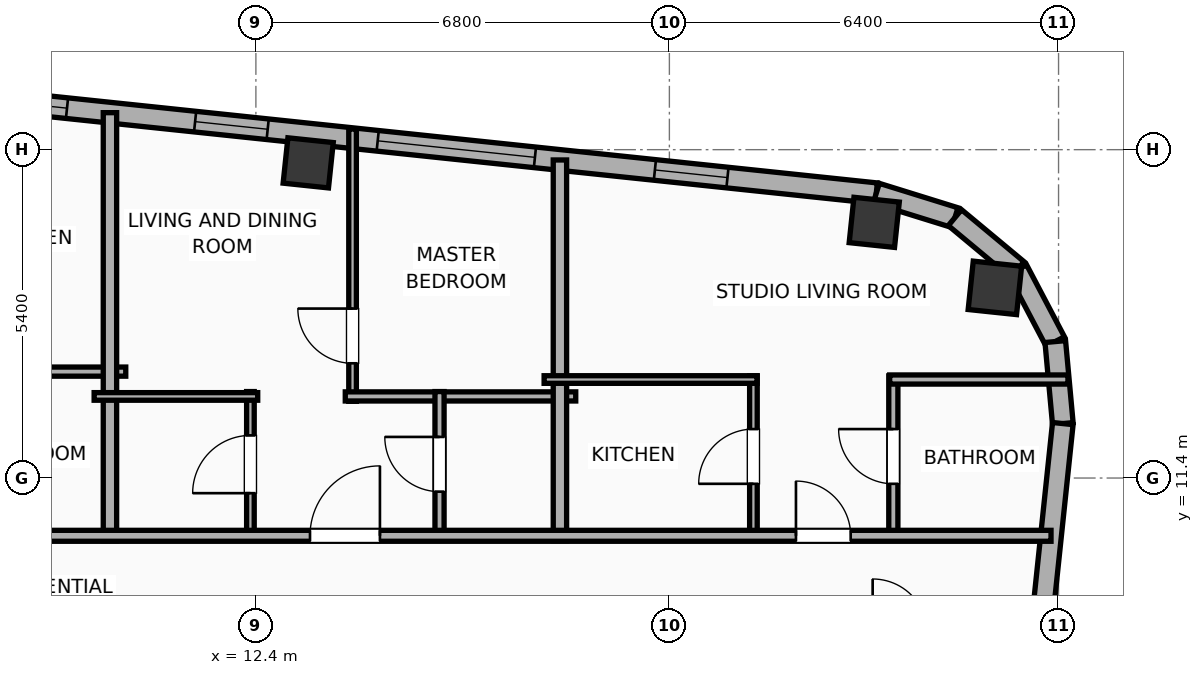
"""IFC4 building model, lengths in metres.
Left out: names, types, materials, properties, quantities, classifications, styles, units other than length and angle.
Written with IfcOpenShell. Run it as: python <this file> out.ifc"""

import sys

from ifc_helpers import new_model, si_unit, direction, frame, frame_2d, origin, origin_2d, place, context, subcontext, project, spatial, rectangle, hollow_rectangle, hollow_circle, extrude, element, fill, save


model = new_model("IFC4")
c1 = context("Model", 3, precision=1e-05, world=origin(), true_north=direction((0.0, 1.0)))
c2 = subcontext(c1, "Body", "Model", "MODEL_VIEW")
j1 = project(units=[si_unit("LENGTHUNIT", "METRE"), si_unit("PLANEANGLEUNIT", "RADIAN")], contexts=[c1])
p1 = place(None, origin())
s1 = spatial("IfcSite", under=j1, at=p1, CompositionType="ELEMENT")
p2 = place(p1, origin())
s2 = spatial("IfcBuilding", under=s1, at=p2, CompositionType="ELEMENT")
p3 = place(p2, frame((0.0, 0.0, 306.8)))
s3 = spatial("IfcBuildingStorey", under=s2, at=p3, CompositionType="ELEMENT", Elevation=306.8)
p4 = place(p3, frame((24.553, 14.527, 0.0), z_axis=(0.0, 0.0, 1.0), x_axis=(0.994521895368, -0.104528463268, 0.0)))
e1 = element("IfcColumn", 1, at=p4, inside=s3, PredefinedType="COLUMN", context=c2, shape_type="SweptSolid", body=[
    extrude(hollow_circle(Radius=0.4, WallThickness=0.028, at=origin_2d()), origin(), (0.0, 0.0, 1.0), 3.865),
])
for number, where, z_axis, x_axis in (
    (2, (22.569, 15.604, 0.0), (0.0, 0.0, 1.0), (0.995, -0.105, 0.0)),
    (3, (13.26, 16.583, 0.0), (0.0, 0.0, 1.0), (0.995, -0.105, 0.0)),
):
    element("IfcColumn", number, at=place(p3, frame(where, z_axis=z_axis, x_axis=x_axis)), inside=s3, PredefinedType="COLUMN", context=c2, shape_type="SweptSolid", body=[
        extrude(hollow_rectangle(XDim=0.75, YDim=0.75, WallThickness=0.025, at=origin_2d()), origin(), (0.0, 0.0, 1.0), 3.865),
    ])
p5 = place(p3, frame((-23.908, 20.972, 0.0), z_axis=(0.0, 0.0, 1.0), x_axis=(0.994521888554, -0.104528528102, 0.0)))
e4 = element("IfcWall", 4, at=p5, inside=s3, PredefinedType="ELEMENTEDWALL", context=c2, shape_type="SweptSolid", body=[
    extrude(rectangle(XDim=46.766, YDim=0.34, at=frame_2d((23.383, 0.0))), origin(), (0.0, 0.0, 1.0), 2.39),
])
p6 = place(p5, frame((23.733, 0.0, 0.65)))
e5 = element("IfcOpeningElement", 5, at=p6, cuts=e4, PredefinedType="OPENING", context=c2, shape_type="SweptSolid", body=[
    extrude(rectangle(XDim=2.6, YDim=1.45, at=frame_2d((1.3, 0.725))), frame((0.0, 0.18, 0.0), z_axis=(0.0, -1.0, 0.0), x_axis=(1.0, 0.0, 0.0)), (0.0, 0.0, 1.0), 0.36),
])
p7 = place(p5, frame((38.522, 0.0, 0.65)))
e6 = element("IfcOpeningElement", 6, at=p7, cuts=e4, PredefinedType="OPENING", context=c2, shape_type="SweptSolid", body=[
    extrude(rectangle(XDim=2.6, YDim=1.45, at=frame_2d((1.3, 0.725))), frame((0.0, 0.18, 0.0), z_axis=(0.0, -1.0, 0.0), x_axis=(1.0, 0.0, 0.0)), (0.0, 0.0, 1.0), 0.36),
])
p8 = place(p5, frame((2.019, 0.0, 0.55)))
e7 = element("IfcOpeningElement", 7, at=p8, cuts=e4, PredefinedType="OPENING", context=c2, shape_type="SweptSolid", body=[
    extrude(rectangle(XDim=1.2, YDim=1.15, at=frame_2d((0.6, 0.575))), frame((0.0, 0.18, 0.0), z_axis=(0.0, -1.0, 0.0), x_axis=(1.0, 0.0, 0.0)), (0.0, 0.0, 1.0), 0.36),
])
p9 = place(p5, frame((9.966, 0.0, 0.55)))
e8 = element("IfcOpeningElement", 8, at=p9, cuts=e4, PredefinedType="OPENING", context=c2, shape_type="SweptSolid", body=[
    extrude(rectangle(XDim=1.2, YDim=1.15, at=frame_2d((0.6, 0.575))), frame((0.0, 0.18, 0.0), z_axis=(0.0, -1.0, 0.0), x_axis=(1.0, 0.0, 0.0)), (0.0, 0.0, 1.0), 0.36),
])
p10 = place(p5, frame((5.046, 0.0, 0.55)))
e9 = element("IfcOpeningElement", 9, at=p10, cuts=e4, PredefinedType="OPENING", context=c2, shape_type="SweptSolid", body=[
    extrude(rectangle(XDim=1.2, YDim=1.15, at=frame_2d((0.6, 0.575))), frame((0.0, 0.18, 0.0), z_axis=(0.0, -1.0, 0.0), x_axis=(1.0, 0.0, 0.0)), (0.0, 0.0, 1.0), 0.36),
])
p11 = place(p5, frame((16.207, 0.0, 0.55)))
e10 = element("IfcOpeningElement", 10, at=p11, cuts=e4, PredefinedType="OPENING", context=c2, shape_type="SweptSolid", body=[
    extrude(rectangle(XDim=1.2, YDim=1.15, at=frame_2d((0.6, 0.575))), frame((0.0, 0.18, 0.0), z_axis=(0.0, -1.0, 0.0), x_axis=(1.0, 0.0, 0.0)), (0.0, 0.0, 1.0), 0.36),
])
p12 = place(p5, frame((12.487, 0.0, 0.55)))
e11 = element("IfcOpeningElement", 11, at=p12, cuts=e4, PredefinedType="OPENING", context=c2, shape_type="SweptSolid", body=[
    extrude(rectangle(XDim=1.2, YDim=1.15, at=frame_2d((0.6, 0.575))), frame((0.0, 0.18, 0.0), z_axis=(0.0, -1.0, 0.0), x_axis=(1.0, 0.0, 0.0)), (0.0, 0.0, 1.0), 0.36),
])
p13 = place(p5, frame((20.621, 0.0, 0.55)))
e12 = element("IfcOpeningElement", 12, at=p13, cuts=e4, PredefinedType="OPENING", context=c2, shape_type="SweptSolid", body=[
    extrude(rectangle(XDim=1.2, YDim=1.15, at=frame_2d((0.6, 0.575))), frame((0.0, 0.18, 0.0), z_axis=(0.0, -1.0, 0.0), x_axis=(1.0, 0.0, 0.0)), (0.0, 0.0, 1.0), 0.36),
])
p14 = place(p5, frame((28.704, 0.0, 0.55)))
e13 = element("IfcOpeningElement", 13, at=p14, cuts=e4, PredefinedType="OPENING", context=c2, shape_type="SweptSolid", body=[
    extrude(rectangle(XDim=1.2, YDim=1.15, at=frame_2d((0.6, 0.575))), frame((0.0, 0.18, 0.0), z_axis=(0.0, -1.0, 0.0), x_axis=(1.0, 0.0, 0.0)), (0.0, 0.0, 1.0), 0.36),
])
p15 = place(p5, frame((32.185, 0.0, 0.55)))
e14 = element("IfcOpeningElement", 14, at=p15, cuts=e4, PredefinedType="OPENING", context=c2, shape_type="SweptSolid", body=[
    extrude(rectangle(XDim=1.2, YDim=1.15, at=frame_2d((0.6, 0.575))), frame((0.0, 0.18, 0.0), z_axis=(0.0, -1.0, 0.0), x_axis=(1.0, 0.0, 0.0)), (0.0, 0.0, 1.0), 0.36),
])
p16 = place(p5, frame((35.503, 0.0, 0.55)))
e15 = element("IfcOpeningElement", 15, at=p16, cuts=e4, PredefinedType="OPENING", context=c2, shape_type="SweptSolid", body=[
    extrude(rectangle(XDim=1.2, YDim=1.15, at=frame_2d((0.6, 0.575))), frame((0.0, 0.18, 0.0), z_axis=(0.0, -1.0, 0.0), x_axis=(1.0, 0.0, 0.0)), (0.0, 0.0, 1.0), 0.36),
])
p17 = place(p5, frame((43.106, 0.0, 0.55)))
e16 = element("IfcOpeningElement", 16, at=p17, cuts=e4, PredefinedType="OPENING", context=c2, shape_type="SweptSolid", body=[
    extrude(rectangle(XDim=1.2, YDim=1.15, at=frame_2d((0.6, 0.575))), frame((0.0, 0.18, 0.0), z_axis=(0.0, -1.0, 0.0), x_axis=(1.0, 0.0, 0.0)), (0.0, 0.0, 1.0), 0.36),
])
p18 = place(p3, frame((22.603, 16.084, 0.0), z_axis=(0.0, 0.0, 1.0), x_axis=(0.955007802701, -0.296580674994, 0.0)))
e17 = element("IfcWall", 17, at=p18, inside=s3, PredefinedType="ELEMENTEDWALL", context=c2, shape_type="SweptSolid", body=[
    extrude(rectangle(XDim=1.354, YDim=0.34, at=frame_2d((0.677, 0.0))), origin(), (0.0, 0.0, 1.0), 2.39),
])
p19 = place(p3, frame((23.896, 15.682, 0.0), z_axis=(0.0, 0.0, 1.0), x_axis=(0.768789762863, -0.639501603217, 0.0)))
e18 = element("IfcWall", 18, at=p19, inside=s3, PredefinedType="ELEMENTEDWALL", context=c2, shape_type="SweptSolid", body=[
    extrude(rectangle(XDim=1.337, YDim=0.34, at=frame_2d((0.668, 0.0))), origin(), (0.0, 0.0, 1.0), 2.39),
])
p20 = place(p3, frame((24.924, 14.827, 0.0), z_axis=(0.0, 0.0, 1.0), x_axis=(0.46567116636, -0.884957832228, 0.0)))
e19 = element("IfcWall", 19, at=p20, inside=s3, PredefinedType="ELEMENTEDWALL", context=c2, shape_type="SweptSolid", body=[
    extrude(rectangle(XDim=1.337, YDim=0.34, at=frame_2d((0.668, 0.0))), origin(), (0.0, 0.0, 1.0), 3.5),
])
p21 = place(p3, frame((25.546, 13.644, 0.0), z_axis=(0.0, 0.0, 1.0), x_axis=(0.091592370975, -0.995796584438, 0.0)))
e20 = element("IfcWall", 20, at=p21, inside=s3, PredefinedType="ELEMENTEDWALL", context=c2, shape_type="SweptSolid", body=[
    extrude(rectangle(XDim=1.354, YDim=0.34, at=frame_2d((0.677, 0.0))), origin(), (0.0, 0.0, 1.0), 3.5),
])
p22 = place(p3, frame((25.67, 12.296, 0.0), z_axis=(0.0, 0.0, 1.0), x_axis=(-0.104533282919, -0.994521388791, 0.0)))
e21 = element("IfcWall", 21, at=p22, inside=s3, PredefinedType="ELEMENTEDWALL", context=c2, shape_type="SweptSolid", body=[
    extrude(rectangle(XDim=30.366, YDim=0.34, at=frame_2d((15.183, 0.0))), origin(), (0.0, 0.0, 1.0), 2.39),
])
p23 = place(p22, frame((5.442, 0.0, 0.65)))
e22 = element("IfcOpeningElement", 22, at=p23, cuts=e21, PredefinedType="OPENING", context=c2, shape_type="SweptSolid", body=[
    extrude(rectangle(XDim=2.6, YDim=1.45, at=frame_2d((1.3, 0.725))), frame((0.0, 0.18, 0.0), z_axis=(0.0, -1.0, 0.0), x_axis=(1.0, 0.0, 0.0)), (0.0, 0.0, 1.0), 0.36),
])
p24 = place(p22, frame((23.125, 0.0, 0.65)))
e23 = element("IfcOpeningElement", 23, at=p24, cuts=e21, PredefinedType="OPENING", context=c2, shape_type="SweptSolid", body=[
    extrude(rectangle(XDim=2.6, YDim=1.45, at=frame_2d((1.3, 0.725))), frame((0.0, 0.18, 0.0), z_axis=(0.0, -1.0, 0.0), x_axis=(1.0, 0.0, 0.0)), (0.0, 0.0, 1.0), 0.36),
])
p25 = place(p22, frame((27.192, 0.0, 0.55)))
e24 = element("IfcOpeningElement", 24, at=p25, cuts=e21, PredefinedType="OPENING", context=c2, shape_type="SweptSolid", body=[
    extrude(rectangle(XDim=1.2, YDim=1.15, at=frame_2d((0.6, 0.575))), frame((0.0, 0.18, 0.0), z_axis=(0.0, -1.0, 0.0), x_axis=(1.0, 0.0, 0.0)), (0.0, 0.0, 1.0), 0.36),
])
p26 = place(p22, frame((18.005, 0.0, 0.55)))
e25 = element("IfcOpeningElement", 25, at=p26, cuts=e21, PredefinedType="OPENING", context=c2, shape_type="SweptSolid", body=[
    extrude(rectangle(XDim=1.2, YDim=1.15, at=frame_2d((0.6, 0.575))), frame((0.0, 0.18, 0.0), z_axis=(0.0, -1.0, 0.0), x_axis=(1.0, 0.0, 0.0)), (0.0, 0.0, 1.0), 0.36),
])
p27 = place(p3, frame((7.31, 13.15, 0.0), z_axis=(0.0, 0.0, 1.0), x_axis=(1.0, 0.0, 0.0)))
e26 = element("IfcWall", 26, at=p27, inside=s3, PredefinedType="PLUMBINGWALL", context=c2, shape_type="SweptSolid", body=[
    extrude(rectangle(XDim=2.95, YDim=0.15, at=frame_2d((1.475, 0.0))), origin(), (0.0, 0.0, 1.0), 3.5),
])
p28 = place(p3, frame((10.0, 10.37, 0.0), z_axis=(0.0, 0.0, 1.0), x_axis=(0.0, 1.0, 0.0)))
e27 = element("IfcWall", 27, at=p28, inside=s3, PredefinedType="PARTITIONING", context=c2, shape_type="SweptSolid", body=[
    extrude(rectangle(XDim=7.038, YDim=0.22, at=frame_2d((3.519, 0.0))), origin(), (0.0, 0.0, 1.0), 3.5),
])
p29 = place(p3, frame((13.99, 12.662, 0.0), z_axis=(0.0, 0.0, 1.0), x_axis=(0.0, 1.0, 0.0)))
e28 = element("IfcWall", 28, at=p29, inside=s3, PredefinedType="PARTITIONING", context=c2, shape_type="SweptSolid", body=[
    extrude(rectangle(XDim=4.478, YDim=0.125, at=frame_2d((2.239, 0.0))), origin(), (0.0, 0.0, 1.0), 3.5),
])
p30 = place(p29, frame((0.625, 0.0, 0.0)))
e29 = element("IfcOpeningElement", 29, at=p30, cuts=e28, PredefinedType="OPENING", context=c2, shape_type="SweptSolid", body=[
    extrude(rectangle(XDim=0.9, YDim=2.05, at=frame_2d((0.45, 1.025))), frame((0.0, 0.073, 0.0), z_axis=(0.0, -1.0, 0.0), x_axis=(1.0, 0.0, 0.0)), (0.0, 0.0, 1.0), 0.145),
])
p31 = place(p3, frame((13.87, 12.742, 0.0), z_axis=(0.0, 0.0, 1.0), x_axis=(1.0, 0.0, 0.0)))
e30 = element("IfcWall", 30, at=p31, inside=s3, PredefinedType="PLUMBINGWALL", context=c2, shape_type="SweptSolid", body=[
    extrude(rectangle(XDim=3.79, YDim=0.15, at=frame_2d((1.895, 0.0))), origin(), (0.0, 0.0, 1.0), 3.5),
])
p32 = place(p3, frame((12.31, 10.43, 0.0), z_axis=(0.0, 0.0, 1.0), x_axis=(0.0, 1.0, 0.0)))
e31 = element("IfcWall", 31, at=p32, inside=s3, PredefinedType="PARTITIONING", context=c2, shape_type="SweptSolid", body=[
    extrude(rectangle(XDim=2.392, YDim=0.125, at=frame_2d((1.196, 0.0))), origin(), (0.0, 0.0, 1.0), 2.39),
])
p33 = place(p32, frame((0.721, 0.0, 0.0)))
e32 = element("IfcOpeningElement", 32, at=p33, cuts=e31, PredefinedType="OPENING", context=c2, shape_type="SweptSolid", body=[
    extrude(rectangle(XDim=0.95, YDim=2.05, at=frame_2d((0.475, 1.025))), frame((0.0, 0.073, 0.0), z_axis=(0.0, -1.0, 0.0), x_axis=(1.0, 0.0, 0.0)), (0.0, 0.0, 1.0), 0.145),
])
p34 = place(p3, frame((9.74, 12.742, 0.0), z_axis=(0.0, 0.0, 1.0), x_axis=(1.0, 0.0, 0.0)))
e33 = element("IfcWall", 33, at=p34, inside=s3, PredefinedType="PARTITIONING", context=c2, shape_type="SweptSolid", body=[
    extrude(rectangle(XDim=2.69, YDim=0.125, at=frame_2d((1.345, 0.0))), origin(), (0.0, 0.0, 1.0), 3.5),
])
p35 = place(p3, frame((15.42, 10.43, 0.0), z_axis=(0.0, 0.0, 1.0), x_axis=(0.0, 1.0, 0.0)))
e34 = element("IfcWall", 34, at=p35, inside=s3, PredefinedType="PLUMBINGWALL", context=c2, shape_type="SweptSolid", body=[
    extrude(rectangle(XDim=2.392, YDim=0.15, at=frame_2d((1.196, 0.0))), origin(), (0.0, 0.0, 1.0), 3.5),
])
p36 = place(p35, frame((0.746, 0.0, 0.0)))
e35 = element("IfcOpeningElement", 35, at=p36, cuts=e34, PredefinedType="OPENING", context=c2, shape_type="SweptSolid", body=[
    extrude(rectangle(XDim=0.9, YDim=2.05, at=frame_2d((0.45, 1.025))), frame((0.0, 0.085, 0.0), z_axis=(0.0, -1.0, 0.0), x_axis=(1.0, 0.0, 0.0)), (0.0, 0.0, 1.0), 0.17),
])
p37 = place(p3, frame((17.4, 10.37, 0.0), z_axis=(0.0, 0.0, 1.0), x_axis=(0.0, 1.0, 0.0)))
e36 = element("IfcWall", 36, at=p37, inside=s3, PredefinedType="PARTITIONING", context=c2, shape_type="SweptSolid", body=[
    extrude(rectangle(XDim=6.26, YDim=0.22, at=frame_2d((3.13, 0.0))), origin(), (0.0, 0.0, 1.0), 3.5),
])
p38 = place(p3, frame((20.582, 10.43, 0.0), z_axis=(0.0, 0.0, 1.0), x_axis=(0.0, 1.0, 0.0)))
e37 = element("IfcWall", 37, at=p38, inside=s3, PredefinedType="PARTITIONING", context=c2, shape_type="SweptSolid", body=[
    extrude(rectangle(XDim=2.65, YDim=0.125, at=frame_2d((1.325, 0.0))), origin(), (0.0, 0.0, 1.0), 2.39),
])
p39 = place(p38, frame((0.875, 0.0, 0.0)))
e38 = element("IfcOpeningElement", 38, at=p39, cuts=e37, PredefinedType="OPENING", context=c2, shape_type="SweptSolid", body=[
    extrude(rectangle(XDim=0.9, YDim=2.05, at=frame_2d((0.45, 1.025))), frame((0.0, 0.073, 0.0), z_axis=(0.0, -1.0, 0.0), x_axis=(1.0, 0.0, 0.0)), (0.0, 0.0, 1.0), 0.145),
])
p40 = place(p3, frame((22.883, 10.43, 0.0), z_axis=(0.0, 0.0, 1.0), x_axis=(0.0, 1.0, 0.0)))
e39 = element("IfcWall", 39, at=p40, inside=s3, PredefinedType="PLUMBINGWALL", context=c2, shape_type="SweptSolid", body=[
    extrude(rectangle(XDim=2.65, YDim=0.15, at=frame_2d((1.325, 0.0))), origin(), (0.0, 0.0, 1.0), 3.5),
])
p41 = place(p40, frame((0.875, 0.0, 0.0)))
e40 = element("IfcOpeningElement", 40, at=p41, cuts=e39, PredefinedType="OPENING", context=c2, shape_type="SweptSolid", body=[
    extrude(rectangle(XDim=0.9, YDim=2.05, at=frame_2d((0.45, 1.025))), frame((0.0, 0.085, 0.0), z_axis=(0.0, -1.0, 0.0), x_axis=(1.0, 0.0, 0.0)), (0.0, 0.0, 1.0), 0.17),
])
p42 = place(p3, frame((17.14, 13.02, 0.0), z_axis=(0.0, 0.0, 1.0), x_axis=(1.0, 0.0, 0.0)))
e41 = element("IfcWall", 41, at=p42, inside=s3, PredefinedType="PARTITIONING", context=c2, shape_type="SweptSolid", body=[
    extrude(rectangle(XDim=3.502, YDim=0.125, at=frame_2d((1.751, 0.0))), origin(), (0.0, 0.0, 1.0), 3.5),
])
p43 = place(p3, frame((22.823, 13.02, 0.0), z_axis=(0.0, 0.0, 1.0), x_axis=(1.0, 0.0, 0.0)))
e42 = element("IfcWall", 42, at=p43, inside=s3, PredefinedType="PLUMBINGWALL", context=c2, shape_type="SweptSolid", body=[
    extrude(rectangle(XDim=2.931, YDim=0.15, at=frame_2d((1.466, 0.0))), origin(), (0.0, 0.0, 1.0), 3.5),
])
p44 = place(p3, frame((-28.479, 10.45, 0.0), z_axis=(0.0, 0.0, 1.0), x_axis=(1.0, 0.0, 0.0)))
e43 = element("IfcWall", 43, at=p44, inside=s3, PredefinedType="PARTITIONING", context=c2, shape_type="SweptSolid", body=[
    extrude(rectangle(XDim=53.956, YDim=0.18, at=frame_2d((26.978, 0.0))), origin(), (0.0, 0.0, 1.0), 3.5),
])
p45 = place(p44, frame((4.065, 0.0, 0.0)))
e44 = element("IfcOpeningElement", 44, at=p45, cuts=e43, PredefinedType="OPENING", context=c2, shape_type="SweptSolid", body=[
    extrude(rectangle(XDim=1.15, YDim=2.05, at=frame_2d((0.575, 1.025))), frame((0.0, 0.1, 0.0), z_axis=(0.0, -1.0, 0.0), x_axis=(1.0, 0.0, 0.0)), (0.0, 0.0, 1.0), 0.2),
])
p46 = place(p44, frame((13.281, 0.0, 0.0)))
e45 = element("IfcOpeningElement", 45, at=p46, cuts=e43, PredefinedType="OPENING", context=c2, shape_type="SweptSolid", body=[
    extrude(rectangle(XDim=1.15, YDim=2.05, at=frame_2d((0.575, 1.025))), frame((0.0, 0.1, 0.0), z_axis=(0.0, -1.0, 0.0), x_axis=(1.0, 0.0, 0.0)), (0.0, 0.0, 1.0), 0.2),
])
p47 = place(p44, frame((20.678, 0.0, 0.0)))
e46 = element("IfcOpeningElement", 46, at=p47, cuts=e43, PredefinedType="OPENING", context=c2, shape_type="SweptSolid", body=[
    extrude(rectangle(XDim=1.15, YDim=2.05, at=frame_2d((0.575, 1.025))), frame((0.0, 0.1, 0.0), z_axis=(0.0, -1.0, 0.0), x_axis=(1.0, 0.0, 0.0)), (0.0, 0.0, 1.0), 0.2),
])
p48 = place(p44, frame((26.969, 0.0, 0.0)))
e47 = element("IfcOpeningElement", 47, at=p48, cuts=e43, PredefinedType="OPENING", context=c2, shape_type="SweptSolid", body=[
    extrude(rectangle(XDim=1.15, YDim=2.05, at=frame_2d((0.575, 1.025))), frame((0.0, 0.1, 0.0), z_axis=(0.0, -1.0, 0.0), x_axis=(1.0, 0.0, 0.0)), (0.0, 0.0, 1.0), 0.2),
])
p49 = place(p44, frame((32.931, 0.0, 0.0)))
e48 = element("IfcOpeningElement", 48, at=p49, cuts=e43, PredefinedType="OPENING", context=c2, shape_type="SweptSolid", body=[
    extrude(rectangle(XDim=1.15, YDim=2.05, at=frame_2d((0.575, 1.025))), frame((0.0, 0.1, 0.0), z_axis=(0.0, -1.0, 0.0), x_axis=(1.0, 0.0, 0.0)), (0.0, 0.0, 1.0), 0.2),
])
p50 = place(p44, frame((41.769, 0.0, 0.0)))
e49 = element("IfcOpeningElement", 49, at=p50, cuts=e43, PredefinedType="OPENING", context=c2, shape_type="SweptSolid", body=[
    extrude(rectangle(XDim=1.15, YDim=2.05, at=frame_2d((0.575, 1.025))), frame((0.0, 0.1, 0.0), z_axis=(0.0, -1.0, 0.0), x_axis=(1.0, 0.0, 0.0)), (0.0, 0.0, 1.0), 0.2),
])
p51 = place(p44, frame((49.761, 0.0, 0.0)))
e50 = element("IfcOpeningElement", 50, at=p51, cuts=e43, PredefinedType="OPENING", context=c2, shape_type="SweptSolid", body=[
    extrude(rectangle(XDim=0.9, YDim=2.05, at=frame_2d((0.45, 1.025))), frame((0.0, 0.1, 0.0), z_axis=(0.0, -1.0, 0.0), x_axis=(1.0, 0.0, 0.0)), (0.0, 0.0, 1.0), 0.2),
])
p52 = place(p7, origin())
e51 = element("IfcWindow", 51, at=p52, inside=s3, PartitioningType="SINGLE_PANEL", PredefinedType="WINDOW", context=c2, shape_type="SweptSolid", body=[
    extrude(rectangle(XDim=2.6, YDim=1.45, at=frame_2d((1.3, 0.725))), frame((0.0, 0.03, 0.0), z_axis=(0.0, -1.0, 0.0), x_axis=(1.0, 0.0, 0.0)), (0.0, 0.0, 1.0), 0.06),
])
fill(e6, e51)
p53 = place(p15, origin())
e52 = element("IfcWindow", 52, at=p53, inside=s3, PartitioningType="SINGLE_PANEL", PredefinedType="WINDOW", context=c2, shape_type="SweptSolid", body=[
    extrude(rectangle(XDim=1.2, YDim=1.15, at=frame_2d((0.6, 0.575))), frame((0.0, 0.03, 0.0), z_axis=(0.0, -1.0, 0.0), x_axis=(1.0, 0.0, 0.0)), (0.0, 0.0, 1.0), 0.06),
])
fill(e14, e52)
p54 = place(p16, origin())
e53 = element("IfcWindow", 53, at=p54, inside=s3, PartitioningType="SINGLE_PANEL", PredefinedType="WINDOW", context=c2, shape_type="SweptSolid", body=[
    extrude(rectangle(XDim=1.2, YDim=1.15, at=frame_2d((0.6, 0.575))), frame((0.0, 0.03, 0.0), z_axis=(0.0, -1.0, 0.0), x_axis=(1.0, 0.0, 0.0)), (0.0, 0.0, 1.0), 0.06),
])
fill(e15, e53)
p55 = place(p17, origin())
e54 = element("IfcWindow", 54, at=p55, inside=s3, PartitioningType="SINGLE_PANEL", PredefinedType="WINDOW", context=c2, shape_type="SweptSolid", body=[
    extrude(rectangle(XDim=1.2, YDim=1.15, at=frame_2d((0.6, 0.575))), frame((0.0, 0.03, 0.0), z_axis=(0.0, -1.0, 0.0), x_axis=(1.0, 0.0, 0.0)), (0.0, 0.0, 1.0), 0.06),
])
fill(e16, e54)
p56 = place(p30, origin())
e55 = element("IfcDoor", 55, at=p56, inside=s3, OperationType="SINGLE_SWING_RIGHT", PredefinedType="DOOR", context=c2, shape_type="SweptSolid", body=[
    extrude(rectangle(XDim=0.9, YDim=2.05, at=frame_2d((0.45, 1.025))), frame((0.0, 0.025, 0.0), z_axis=(0.0, -1.0, 0.0), x_axis=(1.0, 0.0, 0.0)), (0.0, 0.0, 1.0), 0.05),
])
fill(e29, e55)
p57 = place(p33, origin())
e56 = element("IfcDoor", 56, at=p57, inside=s3, OperationType="SINGLE_SWING_LEFT", PredefinedType="DOOR", context=c2, shape_type="SweptSolid", body=[
    extrude(rectangle(XDim=0.95, YDim=2.05, at=frame_2d((0.475, 1.025))), frame((0.0, 0.025, 0.0), z_axis=(0.0, -1.0, 0.0), x_axis=(1.0, 0.0, 0.0)), (0.0, 0.0, 1.0), 0.05),
])
fill(e32, e56)
p58 = place(p36, origin())
e57 = element("IfcDoor", 57, at=p58, inside=s3, OperationType="SINGLE_SWING_RIGHT", PredefinedType="DOOR", context=c2, shape_type="SweptSolid", body=[
    extrude(rectangle(XDim=0.9, YDim=2.05, at=frame_2d((0.45, 1.025))), frame((0.0, 0.025, 0.0), z_axis=(0.0, -1.0, 0.0), x_axis=(1.0, 0.0, 0.0)), (0.0, 0.0, 1.0), 0.05),
])
fill(e35, e57)
p59 = place(p39, origin())
e58 = element("IfcDoor", 58, at=p59, inside=s3, OperationType="SINGLE_SWING_LEFT", PredefinedType="DOOR", context=c2, shape_type="SweptSolid", body=[
    extrude(rectangle(XDim=0.9, YDim=2.05, at=frame_2d((0.45, 1.025))), frame((0.0, 0.025, 0.0), z_axis=(0.0, -1.0, 0.0), x_axis=(1.0, 0.0, 0.0)), (0.0, 0.0, 1.0), 0.05),
])
fill(e38, e58)
p60 = place(p41, origin())
e59 = element("IfcDoor", 59, at=p60, inside=s3, OperationType="SINGLE_SWING_RIGHT", PredefinedType="DOOR", context=c2, shape_type="SweptSolid", body=[
    extrude(rectangle(XDim=0.9, YDim=2.05, at=frame_2d((0.45, 1.025))), frame((0.0, 0.025, 0.0), z_axis=(0.0, -1.0, 0.0), x_axis=(1.0, 0.0, 0.0)), (0.0, 0.0, 1.0), 0.05),
])
fill(e40, e59)
p61 = place(p50, origin())
e60 = element("IfcDoor", 60, at=p61, inside=s3, OperationType="SINGLE_SWING_RIGHT", PredefinedType="DOOR", context=c2, shape_type="SweptSolid", body=[
    extrude(rectangle(XDim=1.15, YDim=2.05, at=frame_2d((0.575, 1.025))), frame((0.0, 0.025, 0.0), z_axis=(0.0, -1.0, 0.0), x_axis=(1.0, 0.0, 0.0)), (0.0, 0.0, 1.0), 0.05),
])
fill(e49, e60)
p62 = place(p51, origin())
e61 = element("IfcDoor", 61, at=p62, inside=s3, OperationType="SINGLE_SWING_LEFT", PredefinedType="DOOR", context=c2, shape_type="SweptSolid", body=[
    extrude(rectangle(XDim=0.9, YDim=2.05, at=frame_2d((0.45, 1.025))), frame((0.0, 0.025, 0.0), z_axis=(0.0, -1.0, 0.0), x_axis=(1.0, 0.0, 0.0)), (0.0, 0.0, 1.0), 0.05),
])
fill(e50, e61)
save(model, sys.argv[1])
